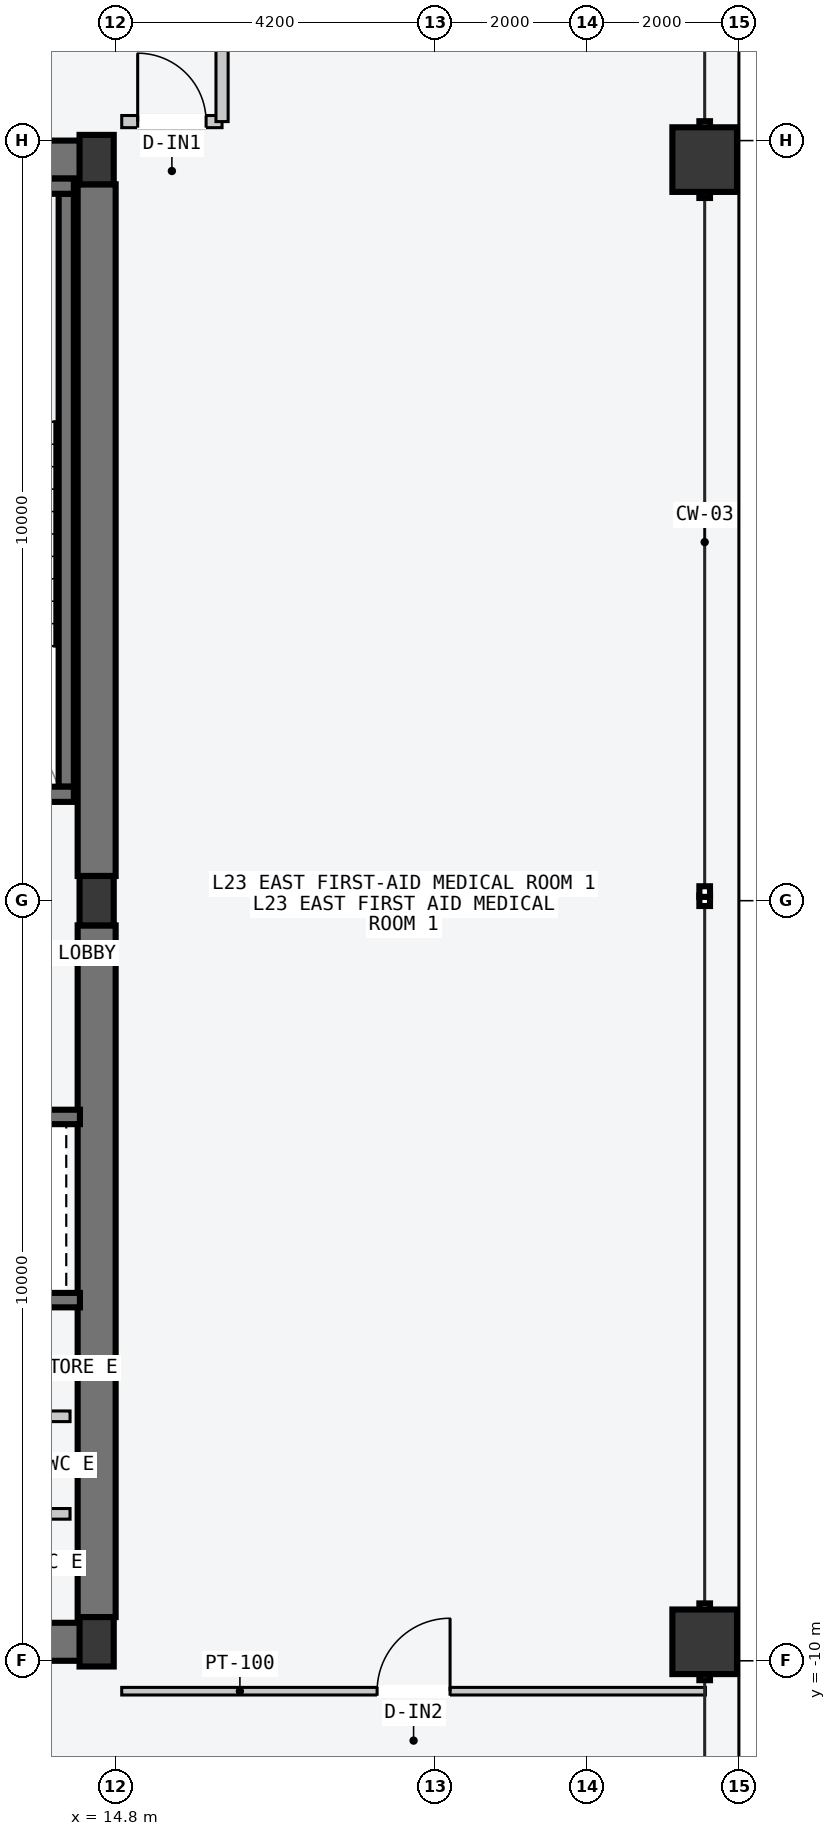
"""IFC4 building model, lengths in metres.
Left out: names, types, materials, properties, quantities, classifications, styles, units other than length and angle.
Written with IfcOpenShell. Run it as: python <this file> out.ifc"""

import sys

from ifc_helpers import new_model, si_unit, direction, frame, frame_2d, origin, origin_2d, place, context, subcontext, project, spatial, rectangle, hollow_rectangle, i_section, extrude, element, fill, save


model = new_model("IFC4")
c1 = context("Model", 3, precision=1e-05, world=origin(), true_north=direction((0.0, 1.0)))
c2 = subcontext(c1, "Body", "Model", "MODEL_VIEW")
j1 = project(units=[si_unit("LENGTHUNIT", "METRE"), si_unit("PLANEANGLEUNIT", "RADIAN")], contexts=[c1])
p1 = place(None, origin())
s1 = spatial("IfcSite", under=j1, at=p1, CompositionType="ELEMENT")
p2 = place(p1, origin())
s2 = spatial("IfcBuilding", under=s1, at=p2, CompositionType="ELEMENT")
p3 = place(p2, frame((0.0, 0.0, 91.8)))
s3 = spatial("IfcBuildingStorey", under=s2, at=p3, CompositionType="ELEMENT", Elevation=91.8)
for number, where, z_axis, x_axis in (
    (1, (8.07, -9.75, -0.2), (0.0, 0.0, 1.0), (1.0, 0.0, 0.0)),
    (2, (8.07, 9.75, -0.2), (0.0, 0.0, 1.0), (1.0, 0.0, 0.0)),
):
    element("IfcWall", number, at=place(p3, frame(where, z_axis=z_axis, x_axis=x_axis)), inside=s3, PredefinedType="SHEAR", context=c2, shape_type="SweptSolid", body=[
        extrude(rectangle(XDim=6.46, YDim=0.5, at=frame_2d((3.23, 0.0))), origin(), (0.0, 0.0, 1.0), 3.6),
    ])
for number, where, z_axis, x_axis in (
    (3, (14.55, -9.425, -0.2), (0.0, 0.0, 1.0), (0.0, 1.0, 0.0)),
    (4, (14.55, 0.325, -0.2), (0.0, 0.0, 1.0), (0.0, 1.0, 0.0)),
):
    element("IfcWall", number, at=place(p3, frame(where, z_axis=z_axis, x_axis=x_axis)), inside=s3, PredefinedType="SHEAR", context=c2, shape_type="SweptSolid", body=[
        extrude(rectangle(XDim=9.1, YDim=0.5, at=frame_2d((4.55, 0.0))), origin(), (0.0, 0.0, 1.0), 3.6),
    ])
p4 = place(p3, frame((14.15, 1.5, -0.2), z_axis=(0.0, 0.0, 1.0), x_axis=(0.0, 1.0, 0.0)))
e5 = element("IfcWall", 5, at=p4, inside=s3, PredefinedType="SOLIDWALL", context=c2, shape_type="SweptSolid", body=[
    extrude(rectangle(XDim=7.8, YDim=0.2, at=frame_2d((3.9, 0.0))), origin(), (0.0, 0.0, 1.0), 3.6),
])
p5 = place(p3, frame((10.15, 1.4, -0.2), z_axis=(0.0, 0.0, 1.0), x_axis=(1.0, 0.0, 0.0)))
e6 = element("IfcWall", 6, at=p5, inside=s3, PredefinedType="SOLIDWALL", context=c2, shape_type="SweptSolid", body=[
    extrude(rectangle(XDim=4.1, YDim=0.2, at=frame_2d((2.05, 0.0))), origin(), (0.0, 0.0, 1.0), 3.6),
])
p6 = place(p5, frame((1.5, 0.0, 0.2)))
e7 = element("IfcOpeningElement", 7, at=p6, cuts=e6, PredefinedType="OPENING", context=c2, shape_type="SweptSolid", body=[
    extrude(rectangle(XDim=1.12, YDim=2.18, at=frame_2d((0.56, 1.09))), frame((0.0, 0.11, 0.0), z_axis=(0.0, -1.0, 0.0), x_axis=(1.0, 0.0, 0.0)), (0.0, 0.0, 1.0), 0.22),
])
p7 = place(p3, frame((10.15, 9.4, -0.2), z_axis=(0.0, 0.0, 1.0), x_axis=(1.0, 0.0, 0.0)))
e8 = element("IfcWall", 8, at=p7, inside=s3, PredefinedType="SOLIDWALL", context=c2, shape_type="SweptSolid", body=[
    extrude(rectangle(XDim=4.1, YDim=0.2, at=frame_2d((2.05, 0.0))), origin(), (0.0, 0.0, 1.0), 3.6),
])
for number, where, z_axis, x_axis in (
    (9, (14.55, -9.75, 0.0), (0.0, 0.0, 1.0), (1.0, 0.0, 0.0)),
    (10, (14.55, 0.0, 0.0), (0.0, 0.0, 1.0), (1.0, 0.0, 0.0)),
    (11, (14.55, 9.75, 0.0), (0.0, 0.0, 1.0), (1.0, 0.0, 0.0)),
):
    element("IfcColumn", number, at=place(p3, frame(where, z_axis=z_axis, x_axis=x_axis)), inside=s3, PredefinedType="COLUMN", context=c2, shape_type="SweptSolid", body=[
        extrude(i_section(OverallWidth=0.45, OverallDepth=0.65, WebThickness=0.025, FlangeThickness=0.04, at=origin_2d()), origin(), (0.0, 0.0, 1.0), 3.6),
    ])
for number, where, z_axis, x_axis in (
    (12, (22.55, -9.75, 0.0), (0.0, 0.0, 1.0), (0.0, 1.0, 0.0)),
    (13, (22.55, 9.75, 0.0), (0.0, 0.0, 1.0), (0.0, 1.0, 0.0)),
):
    element("IfcColumn", number, at=place(p3, frame(where, z_axis=z_axis, x_axis=x_axis)), inside=s3, PredefinedType="COLUMN", context=c2, shape_type="SweptSolid", body=[
        extrude(hollow_rectangle(XDim=0.85, YDim=0.85, WallThickness=0.04, at=origin_2d()), origin(), (0.0, 0.0, 1.0), 3.6),
    ])
p8 = place(p3, frame((11.65, -2.845, -0.2), z_axis=(0.0, 0.0, 1.0), x_axis=(1.0, 0.0, 0.0)))
e14 = element("IfcWall", 14, at=p8, inside=s3, PredefinedType="SOLIDWALL", context=c2, shape_type="SweptSolid", body=[
    extrude(rectangle(XDim=2.68, YDim=0.19, at=frame_2d((1.34, 0.0))), origin(), (0.0, 0.0, 1.0), 3.6),
])
p9 = place(p8, frame((0.65, 0.0, 0.2)))
e15 = element("IfcOpeningElement", 15, at=p9, cuts=e14, PredefinedType="OPENING", context=c2, shape_type="SweptSolid", body=[
    extrude(rectangle(XDim=1.2, YDim=2.2, at=frame_2d((0.6, 1.1))), frame((0.0, 0.105, 0.0), z_axis=(0.0, -1.0, 0.0), x_axis=(1.0, 0.0, 0.0)), (0.0, 0.0, 1.0), 0.21),
])
p10 = place(p3, frame((11.65, -5.255, -0.2), z_axis=(0.0, 0.0, 1.0), x_axis=(1.0, 0.0, 0.0)))
e16 = element("IfcWall", 16, at=p10, inside=s3, PredefinedType="SOLIDWALL", context=c2, shape_type="SweptSolid", body=[
    extrude(rectangle(XDim=2.68, YDim=0.19, at=frame_2d((1.34, 0.0))), origin(), (0.0, 0.0, 1.0), 3.6),
])
for number, where, z_axis, x_axis in (
    (17, (11.7, -8.067, 0.0), (0.0, 0.0, 1.0), (1.0, 0.0, 0.0)),
    (18, (11.7, -6.783, 0.0), (0.0, 0.0, 1.0), (1.0, 0.0, 0.0)),
):
    element("IfcWall", number, at=place(p3, frame(where, z_axis=z_axis, x_axis=x_axis)), inside=s3, PredefinedType="PARTITIONING", context=c2, shape_type="SweptSolid", body=[
        extrude(rectangle(XDim=2.5, YDim=0.14, at=frame_2d((1.25, 0.0))), origin(), (0.0, 0.0, 1.0), 3.4),
    ])
p11 = place(p3, frame((14.88, -10.4, 0.0), z_axis=(0.0, 0.0, 1.0), x_axis=(1.0, 0.0, 0.0)))
e19 = element("IfcWall", 19, at=p11, inside=s3, PredefinedType="PARTITIONING", context=c2, shape_type="SweptSolid", body=[
    extrude(rectangle(XDim=7.68, YDim=0.1, at=frame_2d((3.84, 0.0))), origin(), (0.0, 0.0, 1.0), 3.4),
])
p12 = place(p11, frame((3.36, 0.0, 0.0)))
e20 = element("IfcOpeningElement", 20, at=p12, cuts=e19, PredefinedType="OPENING", context=c2, shape_type="SweptSolid", body=[
    extrude(rectangle(XDim=0.96, YDim=2.18, at=frame_2d((0.48, 1.09))), frame((0.0, 0.06, 0.0), z_axis=(0.0, -1.0, 0.0), x_axis=(1.0, 0.0, 0.0)), (0.0, 0.0, 1.0), 0.12),
])
p13 = place(p3, frame((14.88, 10.25, 0.0), z_axis=(0.0, 0.0, 1.0), x_axis=(1.0, 0.0, 0.0)))
e21 = element("IfcWall", 21, at=p13, inside=s3, PredefinedType="PARTITIONING", context=c2, shape_type="SweptSolid", body=[
    extrude(rectangle(XDim=1.32, YDim=0.16, at=frame_2d((0.66, 0.0))), origin(), (0.0, 0.0, 1.0), 3.4),
])
p14 = place(p13, frame((0.21, 0.0, 0.0)))
e22 = element("IfcOpeningElement", 22, at=p14, cuts=e21, PredefinedType="OPENING", context=c2, shape_type="SweptSolid", body=[
    extrude(rectangle(XDim=0.9, YDim=2.15, at=frame_2d((0.45, 1.075))), frame((0.0, 0.09, 0.0), z_axis=(0.0, -1.0, 0.0), x_axis=(1.0, 0.0, 0.0)), (0.0, 0.0, 1.0), 0.18),
])
p15 = place(p3, frame((16.2, 10.25, 0.0), z_axis=(0.0, 0.0, 1.0), x_axis=(0.0, 1.0, 0.0)))
e23 = element("IfcWall", 23, at=p15, inside=s3, PredefinedType="PARTITIONING", context=c2, shape_type="SweptSolid", body=[
    extrude(rectangle(XDim=1.95, YDim=0.16, at=frame_2d((0.975, 0.0))), origin(), (0.0, 0.0, 1.0), 3.4),
])
p16 = place(p12, origin())
e24 = element("IfcDoor", 24, at=p16, inside=s3, OperationType="SINGLE_SWING_RIGHT", PredefinedType="DOOR", context=c2, shape_type="SweptSolid", body=[
    extrude(rectangle(XDim=0.96, YDim=2.18, at=frame_2d((0.48, 1.09))), frame((0.0, 0.025, 0.0), z_axis=(0.0, -1.0, 0.0), x_axis=(1.0, 0.0, 0.0)), (0.0, 0.0, 1.0), 0.05),
])
fill(e20, e24)
p17 = place(p14, origin())
e25 = element("IfcDoor", 25, at=p17, inside=s3, OperationType="SINGLE_SWING_LEFT", PredefinedType="DOOR", context=c2, shape_type="SweptSolid", body=[
    extrude(rectangle(XDim=0.9, YDim=2.15, at=frame_2d((0.45, 1.075))), frame((0.0, 0.025, 0.0), z_axis=(0.0, -1.0, 0.0), x_axis=(1.0, 0.0, 0.0)), (0.0, 0.0, 1.0), 0.05),
])
fill(e22, e25)
save(model, sys.argv[1])
